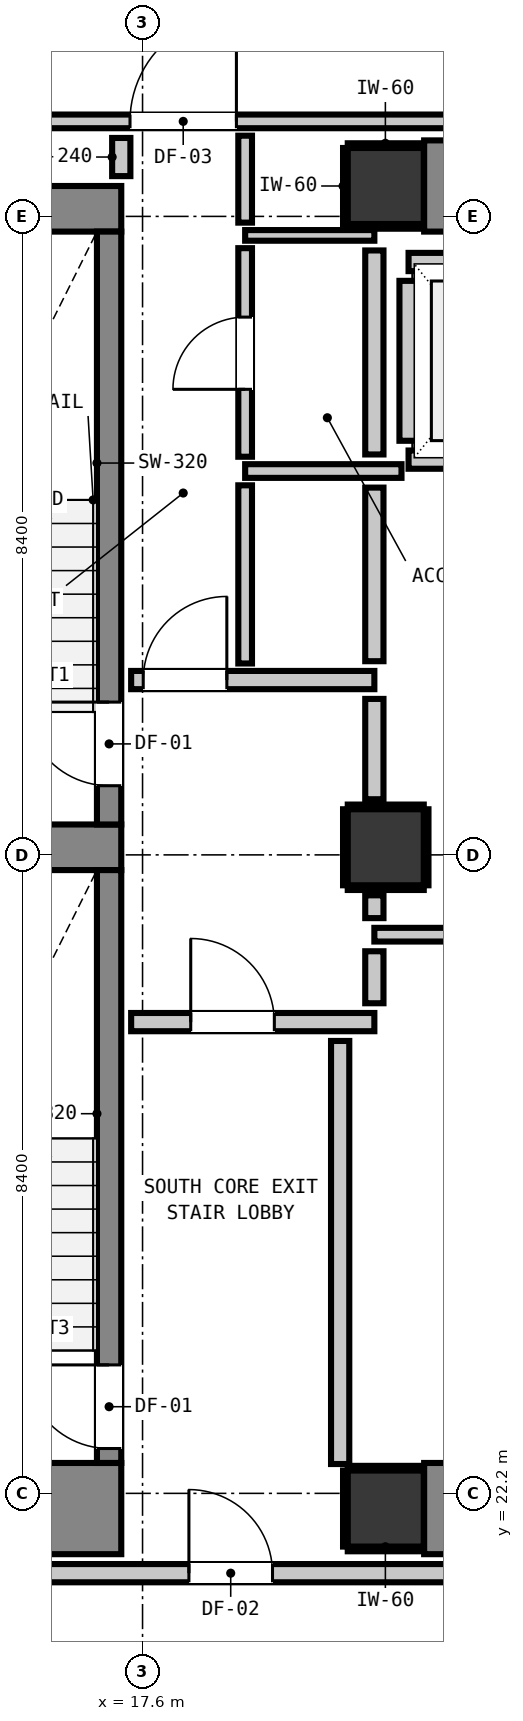
"""IFC4 building model, lengths in metres.
Left out: names, types, materials, properties, quantities, classifications, styles, units other than length and angle.
Written with IfcOpenShell. Run it as: python <this file> out.ifc"""

import sys

from ifc_helpers import new_model, si_unit, direction, frame, frame_2d, origin, origin_2d, place, context, subcontext, project, spatial, rectangle, extrude, element, fill, save


model = new_model("IFC4")
c1 = context("Model", 3, precision=1e-05, world=origin(), true_north=direction((0.0, 1.0)))
c2 = subcontext(c1, "Body", "Model", "MODEL_VIEW")
j1 = project(units=[si_unit("LENGTHUNIT", "METRE"), si_unit("PLANEANGLEUNIT", "RADIAN")], contexts=[c1])
p1 = place(None, origin())
s1 = spatial("IfcSite", under=j1, at=p1, CompositionType="ELEMENT")
p2 = place(p1, origin())
s2 = spatial("IfcBuilding", under=s1, at=p2, CompositionType="ELEMENT")
p3 = place(p2, frame((0.0, 0.0, 38.6)))
s3 = spatial("IfcBuildingStorey", under=s2, at=p3, CompositionType="ELEMENT", Elevation=38.6)
for number, where, z_axis, x_axis in (
    (1, (20.8, 22.0, 0.0), (0.0, 0.0, 1.0), (1.0, 0.0, 0.0)),
    (2, (20.8, 39.4, 0.0), (0.0, 0.0, 1.0), (1.0, 0.0, 0.0)),
):
    element("IfcColumn", number, at=place(p3, frame(where, z_axis=z_axis, x_axis=x_axis)), inside=s3, PredefinedType="COLUMN", context=c2, shape_type="SweptSolid", body=[
        extrude(rectangle(XDim=1.0, YDim=1.0, at=origin_2d()), origin(), (0.0, 0.0, 1.0), 3.32),
    ])
p4 = place(p3, frame((13.24, 22.0, 0.0), z_axis=(0.0, 0.0, 1.0), x_axis=(1.0, 0.0, 0.0)))
e3 = element("IfcWall", 3, at=p4, inside=s3, PredefinedType="SHEAR", context=c2, shape_type="SweptSolid", body=[
    extrude(rectangle(XDim=4.08, YDim=1.2, at=frame_2d((2.04, 0.0))), origin(), (0.0, 0.0, 1.0), 3.32),
])
p5 = place(p3, frame((13.24, 39.1, 0.0), z_axis=(0.0, 0.0, 1.0), x_axis=(1.0, 0.0, 0.0)))
e4 = element("IfcWall", 4, at=p5, inside=s3, PredefinedType="SHEAR", context=c2, shape_type="SweptSolid", body=[
    extrude(rectangle(XDim=4.08, YDim=0.6, at=frame_2d((2.04, 0.0))), origin(), (0.0, 0.0, 1.0), 3.32),
])
p6 = place(p3, frame((13.905, 30.7, 0.0), z_axis=(0.0, 0.0, 1.0), x_axis=(1.0, 0.0, 0.0)))
e5 = element("IfcWall", 5, at=p6, inside=s3, PredefinedType="SHEAR", context=c2, shape_type="SweptSolid", body=[
    extrude(rectangle(XDim=3.415, YDim=0.6, at=frame_2d((1.708, 0.0))), origin(), (0.0, 0.0, 1.0), 3.32),
])
for number, where, z_axis, x_axis in (
    (6, (21.305, 22.0, 0.0), (0.0, 0.0, 1.0), (1.0, 0.0, 0.0)),
    (7, (21.305, 39.4, 0.0), (0.0, 0.0, 1.0), (1.0, 0.0, 0.0)),
):
    element("IfcWall", number, at=place(p3, frame(where, z_axis=z_axis, x_axis=x_axis)), inside=s3, PredefinedType="SHEAR", context=c2, shape_type="SweptSolid", body=[
        extrude(rectangle(XDim=7.39, YDim=1.2, at=frame_2d((3.695, 0.0))), origin(), (0.0, 0.0, 1.0), 3.32),
    ])
p7 = place(p3, frame((17.16, 31.0, 0.0), z_axis=(0.0, 0.0, 1.0), x_axis=(0.0, 1.0, 0.0)))
e8 = element("IfcWall", 8, at=p7, inside=s3, PredefinedType="SHEAR", context=c2, shape_type="SweptSolid", body=[
    extrude(rectangle(XDim=7.8, YDim=0.32, at=frame_2d((3.9, 0.0))), origin(), (0.0, 0.0, 1.0), 3.32),
])
p8 = place(p7, frame((0.51, 0.0, 0.0)))
e9 = element("IfcOpeningElement", 9, at=p8, cuts=e8, PredefinedType="OPENING", context=c2, shape_type="SweptSolid", body=[
    extrude(rectangle(XDim=1.1, YDim=2.15, at=frame_2d((0.55, 1.075))), frame((0.0, 0.17, 0.0), z_axis=(0.0, -1.0, 0.0), x_axis=(1.0, 0.0, 0.0)), (0.0, 0.0, 1.0), 0.34),
])
p9 = place(p3, frame((17.16, 22.6, 0.0), z_axis=(0.0, 0.0, 1.0), x_axis=(0.0, 1.0, 0.0)))
e10 = element("IfcWall", 10, at=p9, inside=s3, PredefinedType="SHEAR", context=c2, shape_type="SweptSolid", body=[
    extrude(rectangle(XDim=7.8, YDim=0.32, at=frame_2d((3.9, 0.0))), origin(), (0.0, 0.0, 1.0), 3.32),
])
p10 = place(p9, frame((0.19, 0.0, 0.0)))
e11 = element("IfcOpeningElement", 11, at=p10, cuts=e10, PredefinedType="OPENING", context=c2, shape_type="SweptSolid", body=[
    extrude(rectangle(XDim=1.1, YDim=2.15, at=frame_2d((0.55, 1.075))), frame((0.0, 0.17, 0.0), z_axis=(0.0, -1.0, 0.0), x_axis=(1.0, 0.0, 0.0)), (0.0, 0.0, 1.0), 0.34),
])
p11 = place(p3, frame((20.8, 30.7, 0.0), z_axis=(0.0, 0.0, 1.0), x_axis=(1.0, 0.0, 0.0)))
e12 = element("IfcColumn", 12, at=p11, inside=s3, PredefinedType="COLUMN", context=c2, shape_type="SweptSolid", body=[
    extrude(rectangle(XDim=1.0, YDim=1.0, at=origin_2d()), origin(), (0.0, 0.0, 1.0), 3.32),
])
for number, where, z_axis, x_axis in (
    (13, (21.1, 35.8, 0.0), (0.0, 0.0, 1.0), (1.0, 0.0, 0.0)),
    (14, (21.1, 38.4, 0.0), (0.0, 0.0, 1.0), (1.0, 0.0, 0.0)),
):
    element("IfcWall", number, at=place(p3, frame(where, z_axis=z_axis, x_axis=x_axis)), inside=s3, PredefinedType="PARTITIONING", context=c2, shape_type="SweptSolid", body=[
        extrude(rectangle(XDim=2.2, YDim=0.24, at=frame_2d((1.1, 0.0))), origin(), (0.0, 0.0, 1.0), 2.9),
    ])
p12 = place(p3, frame((21.1, 36.048, 0.0), z_axis=(0.0, 0.0, 1.0), x_axis=(0.0, 1.0, 0.0)))
e15 = element("IfcWall", 15, at=p12, inside=s3, PredefinedType="PARTITIONING", context=c2, shape_type="SweptSolid", body=[
    extrude(rectangle(XDim=2.104, YDim=0.24, at=frame_2d((1.052, 0.0))), origin(), (0.0, 0.0, 1.0), 0.905),
])
p13 = place(p3, frame((1.827, 21.15, 0.0), z_axis=(0.0, 0.0, 1.0), x_axis=(1.0, 0.0, 0.0)))
e16 = element("IfcWall", 16, at=p13, inside=s3, PredefinedType="PARTITIONING", context=c2, shape_type="SweptSolid", body=[
    extrude(rectangle(XDim=42.146, YDim=0.24, at=frame_2d((21.073, 0.0))), origin(), (0.0, 0.0, 1.0), 2.9),
])
p14 = place(p13, frame((16.383, 0.0, 0.0)))
e17 = element("IfcOpeningElement", 17, at=p14, cuts=e16, PredefinedType="OPENING", context=c2, shape_type="SweptSolid", body=[
    extrude(rectangle(XDim=1.1, YDim=2.15, at=frame_2d((0.55, 1.075))), frame((0.0, 0.13, 0.0), z_axis=(0.0, -1.0, 0.0), x_axis=(1.0, 0.0, 0.0)), (0.0, 0.0, 1.0), 0.26),
])
p15 = place(p13, frame((8.647, 0.0, 0.0)))
e18 = element("IfcOpeningElement", 18, at=p15, cuts=e16, PredefinedType="OPENING", context=c2, shape_type="SweptSolid", body=[
    extrude(rectangle(XDim=1.4, YDim=2.15, at=frame_2d((0.7, 1.075))), frame((0.0, 0.13, 0.0), z_axis=(0.0, -1.0, 0.0), x_axis=(1.0, 0.0, 0.0)), (0.0, 0.0, 1.0), 0.26),
])
p16 = place(p13, frame((38.524, 0.0, 0.0)))
e19 = element("IfcOpeningElement", 19, at=p16, cuts=e16, PredefinedType="OPENING", context=c2, shape_type="SweptSolid", body=[
    extrude(rectangle(XDim=1.0, YDim=2.15, at=frame_2d((0.5, 1.075))), frame((0.0, 0.13, 0.0), z_axis=(0.0, -1.0, 0.0), x_axis=(1.0, 0.0, 0.0)), (0.0, 0.0, 1.0), 0.26),
])
p17 = place(p3, frame((17.45, 28.4, 0.0), z_axis=(0.0, 0.0, 1.0), x_axis=(1.0, 0.0, 0.0)))
e20 = element("IfcWall", 20, at=p17, inside=s3, PredefinedType="PARTITIONING", context=c2, shape_type="SweptSolid", body=[
    extrude(rectangle(XDim=3.2, YDim=0.24, at=frame_2d((1.6, 0.0))), origin(), (0.0, 0.0, 1.0), 2.9),
])
p18 = place(p17, frame((0.784, 0.0, 0.0)))
e21 = element("IfcOpeningElement", 21, at=p18, cuts=e20, PredefinedType="OPENING", context=c2, shape_type="SweptSolid", body=[
    extrude(rectangle(XDim=1.1, YDim=2.15, at=frame_2d((0.55, 1.075))), frame((0.0, 0.13, 0.0), z_axis=(0.0, -1.0, 0.0), x_axis=(1.0, 0.0, 0.0)), (0.0, 0.0, 1.0), 0.26),
])
p19 = place(p3, frame((17.45, 32.9, 0.0), z_axis=(0.0, 0.0, 1.0), x_axis=(1.0, 0.0, 0.0)))
e22 = element("IfcWall", 22, at=p19, inside=s3, PredefinedType="PARTITIONING", context=c2, shape_type="SweptSolid", body=[
    extrude(rectangle(XDim=3.2, YDim=0.24, at=frame_2d((1.6, 0.0))), origin(), (0.0, 0.0, 1.0), 2.9),
])
p20 = place(p19, frame((0.159, 0.0, 0.0)))
e23 = element("IfcOpeningElement", 23, at=p20, cuts=e22, PredefinedType="OPENING", context=c2, shape_type="SweptSolid", body=[
    extrude(rectangle(XDim=1.1, YDim=2.15, at=frame_2d((0.55, 1.075))), frame((0.0, 0.13, 0.0), z_axis=(0.0, -1.0, 0.0), x_axis=(1.0, 0.0, 0.0)), (0.0, 0.0, 1.0), 0.26),
])
p21 = place(p3, frame((20.65, 29.55, 0.0), z_axis=(0.0, 0.0, 1.0), x_axis=(1.0, 0.0, 0.0)))
e24 = element("IfcWall", 24, at=p21, inside=s3, PredefinedType="PARTITIONING", context=c2, shape_type="SweptSolid", body=[
    extrude(rectangle(XDim=9.325, YDim=0.18, at=frame_2d((4.663, 0.0))), origin(), (0.0, 0.0, 1.0), 2.9),
])
p22 = place(p3, frame((18.95, 35.65, 0.0), z_axis=(0.0, 0.0, 1.0), x_axis=(1.0, 0.0, 0.0)))
e25 = element("IfcWall", 25, at=p22, inside=s3, PredefinedType="PARTITIONING", context=c2, shape_type="SweptSolid", body=[
    extrude(rectangle(XDim=2.057, YDim=0.18, at=frame_2d((1.029, 0.0))), origin(), (0.0, 0.0, 1.0), 2.9),
])
p23 = place(p3, frame((1.827, 40.25, 0.0), z_axis=(0.0, 0.0, 1.0), x_axis=(1.0, 0.0, 0.0)))
e26 = element("IfcWall", 26, at=p23, inside=s3, PredefinedType="PARTITIONING", context=c2, shape_type="SweptSolid", body=[
    extrude(rectangle(XDim=42.146, YDim=0.18, at=frame_2d((21.073, 0.0))), origin(), (0.0, 0.0, 1.0), 2.9),
])
p24 = place(p23, frame((15.608, 0.0, 0.0)))
e27 = element("IfcOpeningElement", 27, at=p24, cuts=e26, PredefinedType="OPENING", context=c2, shape_type="SweptSolid", body=[
    extrude(rectangle(XDim=1.4, YDim=2.15, at=frame_2d((0.7, 1.075))), frame((0.0, 0.1, 0.0), z_axis=(0.0, -1.0, 0.0), x_axis=(1.0, 0.0, 0.0)), (0.0, 0.0, 1.0), 0.2),
])
p25 = place(p23, frame((8.647, 0.0, 0.0)))
e28 = element("IfcOpeningElement", 28, at=p25, cuts=e26, PredefinedType="OPENING", context=c2, shape_type="SweptSolid", body=[
    extrude(rectangle(XDim=1.4, YDim=2.15, at=frame_2d((0.7, 1.075))), frame((0.0, 0.1, 0.0), z_axis=(0.0, -1.0, 0.0), x_axis=(1.0, 0.0, 0.0)), (0.0, 0.0, 1.0), 0.2),
])
p26 = place(p23, frame((38.574, 0.0, 0.0)))
e29 = element("IfcOpeningElement", 29, at=p26, cuts=e26, PredefinedType="OPENING", context=c2, shape_type="SweptSolid", body=[
    extrude(rectangle(XDim=0.9, YDim=2.1, at=frame_2d((0.45, 1.05))), frame((0.0, 0.1, 0.0), z_axis=(0.0, -1.0, 0.0), x_axis=(1.0, 0.0, 0.0)), (0.0, 0.0, 1.0), 0.2),
])
p27 = place(p3, frame((18.95, 38.75, 0.0), z_axis=(0.0, 0.0, 1.0), x_axis=(1.0, 0.0, 0.0)))
e30 = element("IfcWall", 30, at=p27, inside=s3, PredefinedType="PARTITIONING", context=c2, shape_type="SweptSolid", body=[
    extrude(rectangle(XDim=1.7, YDim=0.14, at=frame_2d((0.85, 0.0))), origin(), (0.0, 0.0, 1.0), 0.905),
])
p28 = place(p3, frame((17.32, 39.53, 0.0), z_axis=(0.0, 0.0, 1.0), x_axis=(0.0, 1.0, 0.0)))
e31 = element("IfcWall", 31, at=p28, inside=s3, PredefinedType="PARTITIONING", context=c2, shape_type="SweptSolid", body=[
    extrude(rectangle(XDim=0.502, YDim=0.24, at=frame_2d((0.251, 0.0))), origin(), (0.0, 0.0, 1.0), 2.9),
])
p29 = place(p3, frame((20.2, 22.586, 0.0), z_axis=(0.0, 0.0, 1.0), x_axis=(0.0, 1.0, 0.0)))
e32 = element("IfcWall", 32, at=p29, inside=s3, PredefinedType="PARTITIONING", context=c2, shape_type="SweptSolid", body=[
    extrude(rectangle(XDim=5.566, YDim=0.24, at=frame_2d((2.783, 0.0))), origin(), (0.0, 0.0, 1.0), 0.905),
])
p30 = place(p3, frame((20.65, 28.648, 0.0), z_axis=(0.0, 0.0, 1.0), x_axis=(0.0, 1.0, 0.0)))
e33 = element("IfcWall", 33, at=p30, inside=s3, PredefinedType="PARTITIONING", context=c2, shape_type="SweptSolid", body=[
    extrude(rectangle(XDim=0.684, YDim=0.24, at=frame_2d((0.342, 0.0))), origin(), (0.0, 0.0, 1.0), 0.905),
])
p31 = place(p3, frame((20.65, 29.768, 0.0), z_axis=(0.0, 0.0, 1.0), x_axis=(0.0, 1.0, 0.0)))
e34 = element("IfcWall", 34, at=p31, inside=s3, PredefinedType="PARTITIONING", context=c2, shape_type="SweptSolid", body=[
    extrude(rectangle(XDim=0.3, YDim=0.24, at=frame_2d((0.15, 0.0))), origin(), (0.0, 0.0, 1.0), 0.905),
])
p32 = place(p3, frame((20.65, 31.332, 0.0), z_axis=(0.0, 0.0, 1.0), x_axis=(0.0, 1.0, 0.0)))
e35 = element("IfcWall", 35, at=p32, inside=s3, PredefinedType="PARTITIONING", context=c2, shape_type="SweptSolid", body=[
    extrude(rectangle(XDim=1.32, YDim=0.24, at=frame_2d((0.66, 0.0))), origin(), (0.0, 0.0, 1.0), 0.905),
])
p33 = place(p3, frame((20.65, 33.148, 0.0), z_axis=(0.0, 0.0, 1.0), x_axis=(0.0, 1.0, 0.0)))
e36 = element("IfcWall", 36, at=p33, inside=s3, PredefinedType="PARTITIONING", context=c2, shape_type="SweptSolid", body=[
    extrude(rectangle(XDim=2.284, YDim=0.24, at=frame_2d((1.142, 0.0))), origin(), (0.0, 0.0, 1.0), 0.905),
])
p34 = place(p3, frame((20.65, 35.868, 0.0), z_axis=(0.0, 0.0, 1.0), x_axis=(0.0, 1.0, 0.0)))
e37 = element("IfcWall", 37, at=p34, inside=s3, PredefinedType="PARTITIONING", context=c2, shape_type="SweptSolid", body=[
    extrude(rectangle(XDim=2.684, YDim=0.24, at=frame_2d((1.342, 0.0))), origin(), (0.0, 0.0, 1.0), 0.905),
])
p35 = place(p3, frame((18.95, 33.118, 0.0), z_axis=(0.0, 0.0, 1.0), x_axis=(0.0, 1.0, 0.0)))
e38 = element("IfcWall", 38, at=p35, inside=s3, PredefinedType="PARTITIONING", context=c2, shape_type="SweptSolid", body=[
    extrude(rectangle(XDim=2.344, YDim=0.18, at=frame_2d((1.172, 0.0))), origin(), (0.0, 0.0, 1.0), 2.9),
])
p36 = place(p3, frame((18.95, 35.838, 0.0), z_axis=(0.0, 0.0, 1.0), x_axis=(0.0, 1.0, 0.0)))
e39 = element("IfcWall", 39, at=p36, inside=s3, PredefinedType="PARTITIONING", context=c2, shape_type="SweptSolid", body=[
    extrude(rectangle(XDim=2.744, YDim=0.18, at=frame_2d((1.372, 0.0))), origin(), (0.0, 0.0, 1.0), 2.9),
])
p37 = place(p36, frame((0.887, 0.0, 0.0)))
e40 = element("IfcOpeningElement", 40, at=p37, cuts=e39, PredefinedType="OPENING", context=c2, shape_type="SweptSolid", body=[
    extrude(rectangle(XDim=0.95, YDim=2.1, at=frame_2d((0.475, 1.05))), frame((0.0, 0.1, 0.0), z_axis=(0.0, -1.0, 0.0), x_axis=(1.0, 0.0, 0.0)), (0.0, 0.0, 1.0), 0.2),
])
p38 = place(p3, frame((18.95, 38.918, 0.0), z_axis=(0.0, 0.0, 1.0), x_axis=(0.0, 1.0, 0.0)))
e41 = element("IfcWall", 41, at=p38, inside=s3, PredefinedType="PARTITIONING", context=c2, shape_type="SweptSolid", body=[
    extrude(rectangle(XDim=1.144, YDim=0.18, at=frame_2d((0.572, 0.0))), origin(), (0.0, 0.0, 1.0), 2.9),
])
for number, where, z_axis, x_axis in (
    (42, (20.3, 21.468, 0.0), (0.0, 0.0, 1.0), (1.0, 0.0, 0.0)),
    (43, (20.3, 22.532, 0.0), (0.0, 0.0, 1.0), (1.0, 0.0, 0.0)),
):
    element("IfcWall", number, at=place(p3, frame(where, z_axis=z_axis, x_axis=x_axis)), inside=s3, PredefinedType="PARTITIONING", context=c2, shape_type="SweptSolid", body=[
        extrude(rectangle(XDim=0.99, YDim=0.06, at=frame_2d((0.495, 0.0))), origin(), (0.0, 0.0, 1.0), 0.905),
    ])
p39 = place(p3, frame((20.268, 21.5, 0.0), z_axis=(0.0, 0.0, 1.0), x_axis=(0.0, 1.0, 0.0)))
e44 = element("IfcWall", 44, at=p39, inside=s3, PredefinedType="PARTITIONING", context=c2, shape_type="SweptSolid", body=[
    extrude(rectangle(XDim=1.0, YDim=0.06, at=frame_2d((0.5, 0.0))), origin(), (0.0, 0.0, 1.0), 0.905),
])
for number, where, z_axis, x_axis in (
    (45, (20.3, 38.868, 0.0), (0.0, 0.0, 1.0), (1.0, 0.0, 0.0)),
    (46, (20.3, 39.932, 0.0), (0.0, 0.0, 1.0), (1.0, 0.0, 0.0)),
):
    element("IfcWall", number, at=place(p3, frame(where, z_axis=z_axis, x_axis=x_axis)), inside=s3, PredefinedType="PARTITIONING", context=c2, shape_type="SweptSolid", body=[
        extrude(rectangle(XDim=0.99, YDim=0.06, at=frame_2d((0.495, 0.0))), origin(), (0.0, 0.0, 1.0), 0.905),
    ])
for number, where, z_axis, x_axis in (
    (47, (20.268, 38.9, 0.0), (0.0, 0.0, 1.0), (0.0, 1.0, 0.0)),
    (48, (20.3, 30.168, 0.0), (0.0, 0.0, 1.0), (1.0, 0.0, 0.0)),
    (49, (20.3, 31.232, 0.0), (0.0, 0.0, 1.0), (1.0, 0.0, 0.0)),
    (50, (20.268, 30.2, 0.0), (0.0, 0.0, 1.0), (0.0, 1.0, 0.0)),
    (51, (21.332, 30.2, 0.0), (0.0, 0.0, 1.0), (0.0, 1.0, 0.0)),
):
    element("IfcWall", number, at=place(p3, frame(where, z_axis=z_axis, x_axis=x_axis)), inside=s3, PredefinedType="PARTITIONING", context=c2, shape_type="SweptSolid", body=[
        extrude(rectangle(XDim=1.0, YDim=0.06, at=frame_2d((0.5, 0.0))), origin(), (0.0, 0.0, 1.0), 0.905),
    ])
p40 = place(p8, origin())
e52 = element("IfcDoor", 52, at=p40, inside=s3, OperationType="SINGLE_SWING_RIGHT", PredefinedType="DOOR", context=c2, shape_type="SweptSolid", body=[
    extrude(rectangle(XDim=1.1, YDim=2.15, at=frame_2d((0.55, 1.075))), frame((0.0, 0.025, 0.0), z_axis=(0.0, -1.0, 0.0), x_axis=(1.0, 0.0, 0.0)), (0.0, 0.0, 1.0), 0.05),
])
fill(e9, e52)
p41 = place(p10, origin())
e53 = element("IfcDoor", 53, at=p41, inside=s3, OperationType="SINGLE_SWING_RIGHT", PredefinedType="DOOR", context=c2, shape_type="SweptSolid", body=[
    extrude(rectangle(XDim=1.1, YDim=2.15, at=frame_2d((0.55, 1.075))), frame((0.0, 0.025, 0.0), z_axis=(0.0, -1.0, 0.0), x_axis=(1.0, 0.0, 0.0)), (0.0, 0.0, 1.0), 0.05),
])
fill(e11, e53)
p42 = place(p18, origin())
e54 = element("IfcDoor", 54, at=p42, inside=s3, OperationType="SINGLE_SWING_LEFT", PredefinedType="DOOR", context=c2, shape_type="SweptSolid", body=[
    extrude(rectangle(XDim=1.1, YDim=2.15, at=frame_2d((0.55, 1.075))), frame((0.0, 0.025, 0.0), z_axis=(0.0, -1.0, 0.0), x_axis=(1.0, 0.0, 0.0)), (0.0, 0.0, 1.0), 0.05),
])
fill(e21, e54)
p43 = place(p20, origin())
e55 = element("IfcDoor", 55, at=p43, inside=s3, OperationType="SINGLE_SWING_RIGHT", PredefinedType="DOOR", context=c2, shape_type="SweptSolid", body=[
    extrude(rectangle(XDim=1.1, YDim=2.15, at=frame_2d((0.55, 1.075))), frame((0.0, 0.025, 0.0), z_axis=(0.0, -1.0, 0.0), x_axis=(1.0, 0.0, 0.0)), (0.0, 0.0, 1.0), 0.05),
])
fill(e23, e55)
p44 = place(p14, origin())
e56 = element("IfcDoor", 56, at=p44, inside=s3, OperationType="SINGLE_SWING_LEFT", PredefinedType="DOOR", context=c2, shape_type="SweptSolid", body=[
    extrude(rectangle(XDim=1.1, YDim=2.15, at=frame_2d((0.55, 1.075))), frame((0.0, 0.025, 0.0), z_axis=(0.0, -1.0, 0.0), x_axis=(1.0, 0.0, 0.0)), (0.0, 0.0, 1.0), 0.05),
])
fill(e17, e56)
p45 = place(p24, origin())
e57 = element("IfcDoor", 57, at=p45, inside=s3, OperationType="SINGLE_SWING_RIGHT", PredefinedType="DOOR", context=c2, shape_type="SweptSolid", body=[
    extrude(rectangle(XDim=1.4, YDim=2.15, at=frame_2d((0.7, 1.075))), frame((0.0, 0.025, 0.0), z_axis=(0.0, -1.0, 0.0), x_axis=(1.0, 0.0, 0.0)), (0.0, 0.0, 1.0), 0.05),
])
fill(e27, e57)
p46 = place(p37, origin())
e58 = element("IfcDoor", 58, at=p46, inside=s3, OperationType="SINGLE_SWING_LEFT", PredefinedType="DOOR", context=c2, shape_type="SweptSolid", body=[
    extrude(rectangle(XDim=0.95, YDim=2.1, at=frame_2d((0.475, 1.05))), frame((0.0, 0.025, 0.0), z_axis=(0.0, -1.0, 0.0), x_axis=(1.0, 0.0, 0.0)), (0.0, 0.0, 1.0), 0.05),
])
fill(e40, e58)
save(model, sys.argv[1])
